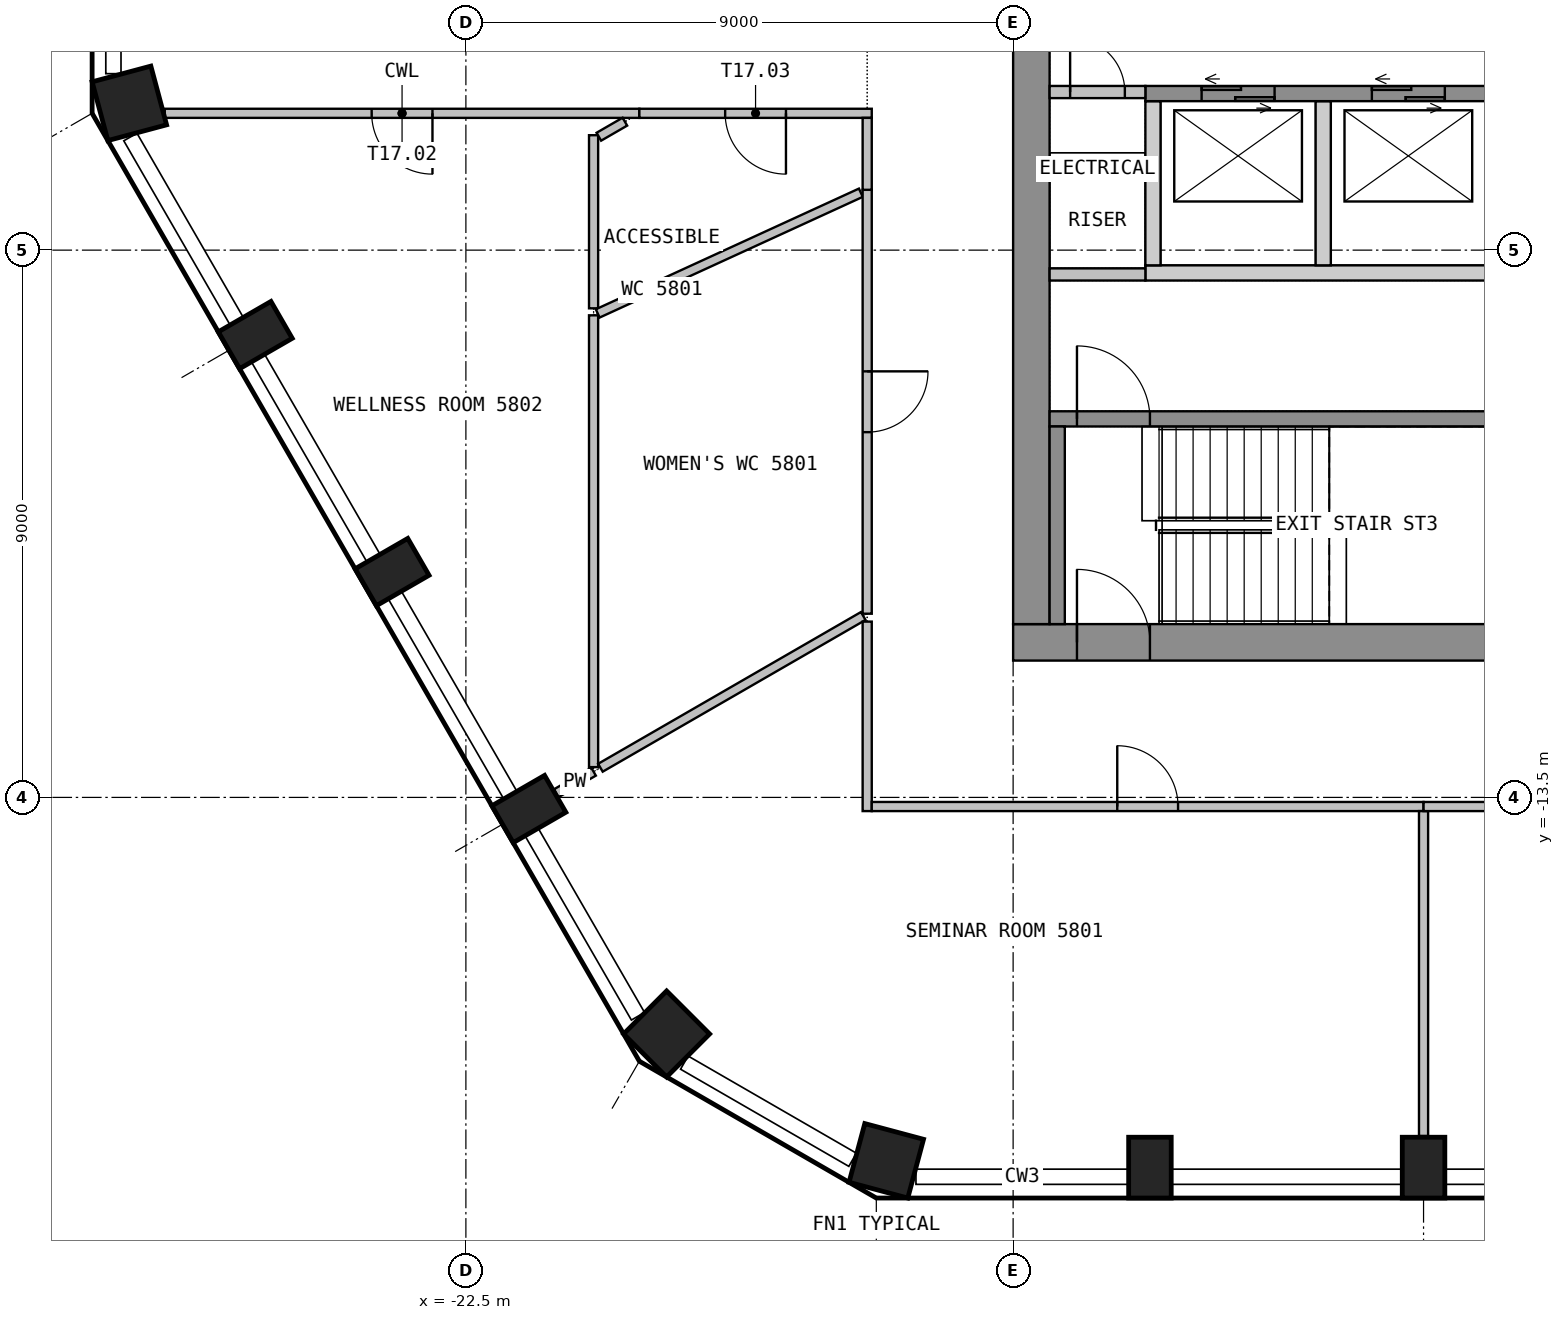
"""IFC4 building model, lengths in metres.
Left out: names, types, materials, properties, quantities, classifications, styles, units other than length and angle.
Written with IfcOpenShell. Run it as: python <this file> out.ifc"""

import sys

from ifc_helpers import new_model, si_unit, direction, frame, frame_2d, origin, origin_2d, place, context, subcontext, project, spatial, polyline, rectangle, outline, extrude, element, fill, save


model = new_model("IFC4")
c1 = context("Model", 3, precision=1e-05, world=origin(), true_north=direction((0.0, 1.0)))
c2 = subcontext(c1, "Body", "Model", "MODEL_VIEW")
j1 = project(units=[si_unit("LENGTHUNIT", "METRE"), si_unit("PLANEANGLEUNIT", "RADIAN")], contexts=[c1])
p1 = place(None, origin())
s1 = spatial("IfcSite", under=j1, at=p1, CompositionType="ELEMENT")
p2 = place(p1, origin())
s2 = spatial("IfcBuilding", under=s1, at=p2, CompositionType="ELEMENT")
p3 = place(p2, frame((0.0, 0.0, 235.2)))
s3 = spatial("IfcBuildingStorey", under=s2, at=p3, CompositionType="ELEMENT", Elevation=235.2)
p4 = place(p3, frame((-15.586, -19.476, 0.0), z_axis=(0.0, 0.0, 1.0), x_axis=(0.965925826289, -0.258819045103, 0.0)))
e1 = element("IfcColumn", 1, at=p4, inside=s3, PredefinedType="COLUMN", context=c2, shape_type="SweptSolid", body=[
    extrude(rectangle(XDim=1.0, YDim=1.0, at=origin_2d()), origin(), (0.0, 0.0, 1.0), 3.575),
])
for number, where, z_axis, x_axis in (
    (2, (-11.25, -19.588, 0.0), (0.0, 0.0, 1.0), (1.0, 0.0, 0.0)),
    (3, (-6.75, -19.588, 0.0), (0.0, 0.0, 1.0), (1.0, 0.0, 0.0)),
):
    element("IfcColumn", number, at=place(p3, frame(where, z_axis=z_axis, x_axis=x_axis)), inside=s3, PredefinedType="COLUMN", context=c2, shape_type="SweptSolid", body=[
        extrude(rectangle(XDim=0.7, YDim=1.0, at=origin_2d()), origin(), (0.0, 0.0, 1.0), 3.575),
    ])
p5 = place(p3, frame((-28.035, -2.086, 0.0), z_axis=(0.0, 0.0, 1.0), x_axis=(0.258819045103, -0.965925826289, 0.0)))
e4 = element("IfcColumn", 4, at=p5, inside=s3, PredefinedType="COLUMN", context=c2, shape_type="SweptSolid", body=[
    extrude(rectangle(XDim=1.0, YDim=1.0, at=origin_2d()), origin(), (0.0, 0.0, 1.0), 3.575),
])
for number, where, z_axis, x_axis in (
    (5, (-25.964, -5.897, 0.0), (0.0, 0.0, 1.0), (0.5, -0.866, 0.0)),
    (6, (-23.714, -9.794, 0.0), (0.0, 0.0, 1.0), (0.5, -0.866, 0.0)),
    (7, (-21.464, -13.691, 0.0), (0.0, 0.0, 1.0), (0.5, -0.866, 0.0)),
):
    element("IfcColumn", number, at=place(p3, frame(where, z_axis=z_axis, x_axis=x_axis)), inside=s3, PredefinedType="COLUMN", context=c2, shape_type="SweptSolid", body=[
        extrude(rectangle(XDim=0.7, YDim=1.0, at=origin_2d()), origin(), (0.0, 0.0, 1.0), 3.575),
    ])
p6 = place(p3, frame((-19.199, -17.39, 0.0), z_axis=(0.0, 0.0, 1.0), x_axis=(0.707106781187, -0.707106781187, 0.0)))
e8 = element("IfcColumn", 8, at=p6, inside=s3, PredefinedType="COLUMN", context=c2, shape_type="SweptSolid", body=[
    extrude(rectangle(XDim=1.0, YDim=1.0, at=origin_2d()), origin(), (0.0, 0.0, 1.0), 3.575),
])
p7 = place(p3, frame((-13.5, -10.95, 0.0), z_axis=(0.0, 0.0, 1.0), x_axis=(1.0, 0.0, 0.0)))
e9 = element("IfcWall", 9, at=p7, inside=s3, PredefinedType="SHEAR", context=c2, shape_type="SweptSolid", body=[
    extrude(rectangle(XDim=27.0, YDim=0.6, at=frame_2d((13.5, 0.0))), origin(), (0.0, 0.0, 1.0), 3.575),
])
p8 = place(p7, frame((12.3, 0.0, 0.0)))
e10 = element("IfcOpeningElement", 10, at=p8, cuts=e9, PredefinedType="OPENING", context=c2, shape_type="SweptSolid", body=[
    extrude(rectangle(XDim=2.4, YDim=2.1, at=frame_2d((1.2, 1.05))), frame((0.0, 0.31, 0.0), z_axis=(0.0, -1.0, 0.0), x_axis=(1.0, 0.0, 0.0)), (0.0, 0.0, 1.0), 0.62),
])
p9 = place(p7, frame((1.05, 0.0, 0.0)))
e11 = element("IfcOpeningElement", 11, at=p9, cuts=e9, PredefinedType="OPENING", context=c2, shape_type="SweptSolid", body=[
    extrude(rectangle(XDim=1.2, YDim=2.1, at=frame_2d((0.6, 1.05))), frame((0.0, 0.31, 0.0), z_axis=(0.0, -1.0, 0.0), x_axis=(1.0, 0.0, 0.0)), (0.0, 0.0, 1.0), 0.62),
])
p10 = place(p7, frame((24.75, 0.0, 0.0)))
e12 = element("IfcOpeningElement", 12, at=p10, cuts=e9, PredefinedType="OPENING", context=c2, shape_type="SweptSolid", body=[
    extrude(rectangle(XDim=1.2, YDim=2.1, at=frame_2d((0.6, 1.05))), frame((0.0, 0.31, 0.0), z_axis=(0.0, -1.0, 0.0), x_axis=(1.0, 0.0, 0.0)), (0.0, 0.0, 1.0), 0.62),
])
p11 = place(p3, frame((-13.2, -10.65, 0.0), z_axis=(0.0, 0.0, 1.0), x_axis=(0.0, 1.0, 0.0)))
e13 = element("IfcWall", 13, at=p11, inside=s3, PredefinedType="SHEAR", context=c2, shape_type="SweptSolid", body=[
    extrude(rectangle(XDim=21.3, YDim=0.6, at=frame_2d((10.65, 0.0))), origin(), (0.0, 0.0, 1.0), 3.575),
])
p12 = place(p11, frame((9.45, 0.0, 0.0)))
e14 = element("IfcOpeningElement", 14, at=p12, cuts=e13, PredefinedType="OPENING", context=c2, shape_type="SweptSolid", body=[
    extrude(rectangle(XDim=2.4, YDim=2.1, at=frame_2d((1.2, 1.05))), frame((0.0, 0.31, 0.0), z_axis=(0.0, -1.0, 0.0), x_axis=(1.0, 0.0, 0.0)), (0.0, 0.0, 1.0), 0.62),
])
p13 = place(p3, origin())
e15 = element("IfcWall", 15, at=p13, inside=s3, PredefinedType="SHEAR", context=c2, shape_type="SweptSolid", body=[
    extrude(outline(polyline([(-11.325, -5.0), (-2.675, -5.0), (-2.675, -4.75), (-11.325, -4.75), (-11.325, -5.0)])), origin(), (0.0, 0.0, 1.0), 3.575),
])
p14 = place(p3, origin())
e16 = element("IfcWall", 16, at=p14, inside=s3, PredefinedType="SHEAR", context=c2, shape_type="SweptSolid", body=[
    extrude(outline(polyline([(-11.325, -4.75), (-11.075, -4.75), (-11.075, -2.05), (-11.325, -2.05), (-11.325, -4.75)])), origin(), (0.0, 0.0, 1.0), 3.575),
])
p15 = place(p3, origin())
e17 = element("IfcWall", 17, at=p15, inside=s3, PredefinedType="SHEAR", context=c2, shape_type="SweptSolid", body=[
    extrude(outline(polyline([(-8.525, -4.75), (-8.275, -4.75), (-8.275, -2.05), (-8.525, -2.05), (-8.525, -4.75)])), origin(), (0.0, 0.0, 1.0), 3.575),
])
p16 = place(p3, frame((-11.325, -1.925, 0.0), z_axis=(0.0, 0.0, 1.0), x_axis=(1.0, 0.0, 0.0)))
e18 = element("IfcWall", 18, at=p16, inside=s3, PredefinedType="SHEAR", context=c2, shape_type="SweptSolid", body=[
    extrude(rectangle(XDim=8.65, YDim=0.25, at=frame_2d((4.325, 0.0))), origin(), (0.0, 0.0, 1.0), 3.575),
])
p17 = place(p16, frame((0.925, 0.0, 0.0)))
e19 = element("IfcOpeningElement", 19, at=p17, cuts=e18, PredefinedType="OPENING", context=c2, shape_type="SweptSolid", body=[
    extrude(rectangle(XDim=1.2, YDim=2.1, at=frame_2d((0.6, 1.05))), frame((0.0, 0.135, 0.0), z_axis=(0.0, -1.0, 0.0), x_axis=(1.0, 0.0, 0.0)), (0.0, 0.0, 1.0), 0.27),
])
p18 = place(p16, frame((3.725, 0.0, 0.0)))
e20 = element("IfcOpeningElement", 20, at=p18, cuts=e18, PredefinedType="OPENING", context=c2, shape_type="SweptSolid", body=[
    extrude(rectangle(XDim=1.2, YDim=2.1, at=frame_2d((0.6, 1.05))), frame((0.0, 0.135, 0.0), z_axis=(0.0, -1.0, 0.0), x_axis=(1.0, 0.0, 0.0)), (0.0, 0.0, 1.0), 0.27),
])
p19 = place(p16, frame((6.525, 0.0, 0.0)))
e21 = element("IfcOpeningElement", 21, at=p19, cuts=e18, PredefinedType="OPENING", context=c2, shape_type="SweptSolid", body=[
    extrude(rectangle(XDim=1.2, YDim=2.1, at=frame_2d((0.6, 1.05))), frame((0.0, 0.135, 0.0), z_axis=(0.0, -1.0, 0.0), x_axis=(1.0, 0.0, 0.0)), (0.0, 0.0, 1.0), 0.27),
])
p20 = place(p3, frame((-12.9, -7.275, 0.0), z_axis=(0.0, 0.0, 1.0), x_axis=(1.0, 0.0, 0.0)))
e22 = element("IfcWall", 22, at=p20, inside=s3, PredefinedType="SHEAR", context=c2, shape_type="SweptSolid", body=[
    extrude(rectangle(XDim=10.1, YDim=0.25, at=frame_2d((5.05, 0.0))), origin(), (0.0, 0.0, 1.0), 3.575),
])
p21 = place(p20, frame((0.45, 0.0, 0.0)))
e23 = element("IfcOpeningElement", 23, at=p21, cuts=e22, PredefinedType="OPENING", context=c2, shape_type="SweptSolid", body=[
    extrude(rectangle(XDim=1.2, YDim=2.1, at=frame_2d((0.6, 1.05))), frame((0.0, 0.135, 0.0), z_axis=(0.0, -1.0, 0.0), x_axis=(1.0, 0.0, 0.0)), (0.0, 0.0, 1.0), 0.27),
])
p22 = place(p3, frame((-12.775, -10.65, 0.0), z_axis=(0.0, 0.0, 1.0), x_axis=(0.0, 1.0, 0.0)))
e24 = element("IfcWall", 24, at=p22, inside=s3, PredefinedType="SHEAR", context=c2, shape_type="SweptSolid", body=[
    extrude(rectangle(XDim=3.25, YDim=0.25, at=frame_2d((1.625, 0.0))), origin(), (0.0, 0.0, 1.0), 3.575),
])
p23 = place(p3, frame((-12.9, -1.9, 0.0), z_axis=(0.0, 0.0, 1.0), x_axis=(1.0, 0.0, 0.0)))
e25 = element("IfcWall", 25, at=p23, inside=s3, PredefinedType="PARTITIONING", context=c2, shape_type="SweptSolid", body=[
    extrude(rectangle(XDim=1.575, YDim=0.2, at=frame_2d((0.788, 0.0))), origin(), (0.0, 0.0, 1.0), 3.575),
])
p24 = place(p23, frame((0.337, 0.0, 0.0)))
e26 = element("IfcOpeningElement", 26, at=p24, cuts=e25, PredefinedType="OPENING", context=c2, shape_type="SweptSolid", body=[
    extrude(rectangle(XDim=0.9, YDim=2.1, at=frame_2d((0.45, 1.05))), frame((0.0, 0.11, 0.0), z_axis=(0.0, -1.0, 0.0), x_axis=(1.0, 0.0, 0.0)), (0.0, 0.0, 1.0), 0.22),
])
p25 = place(p3, frame((-12.9, -4.9, 0.0), z_axis=(0.0, 0.0, 1.0), x_axis=(1.0, 0.0, 0.0)))
e27 = element("IfcWall", 27, at=p25, inside=s3, PredefinedType="PARTITIONING", context=c2, shape_type="SweptSolid", body=[
    extrude(rectangle(XDim=1.575, YDim=0.2, at=frame_2d((0.788, 0.0))), origin(), (0.0, 0.0, 1.0), 3.575),
])
p26 = place(p3, frame((-19.647, -2.25, 0.0), z_axis=(0.0, 0.0, 1.0), x_axis=(-1.0, 0.0, 0.0)))
e28 = element("IfcWall", 28, at=p26, inside=s3, PredefinedType="PARTITIONING", context=c2, shape_type="SweptSolid", body=[
    extrude(rectangle(XDim=7.805, YDim=0.15, at=frame_2d((3.903, 0.0))), origin(), (0.0, 0.0, 1.0), 3.575),
])
p27 = place(p26, frame((3.403, 0.0, 0.0)))
e29 = element("IfcOpeningElement", 29, at=p27, cuts=e28, PredefinedType="OPENING", context=c2, shape_type="SweptSolid", body=[
    extrude(rectangle(XDim=1.0, YDim=2.1, at=frame_2d((0.5, 1.05))), frame((0.0, 0.085, 0.0), z_axis=(0.0, -1.0, 0.0), x_axis=(1.0, 0.0, 0.0)), (0.0, 0.0, 1.0), 0.17),
])
p28 = place(p3, frame((-20.4, -13.077, 0.0), z_axis=(0.0, 0.0, 1.0), x_axis=(-0.866030760678, -0.499990721473, 0.0)))
e30 = element("IfcWall", 30, at=p28, inside=s3, PredefinedType="PARTITIONING", context=c2, shape_type="SweptSolid", body=[
    extrude(rectangle(XDim=0.709, YDim=0.15, at=frame_2d((0.354, 0.0))), origin(), (0.0, 0.0, 1.0), 3.575),
])
p29 = place(p3, frame((-20.4, -5.572, 0.0), z_axis=(0.0, 0.0, 1.0), x_axis=(0.0, -1.0, 0.0)))
e31 = element("IfcWall", 31, at=p29, inside=s3, PredefinedType="PARTITIONING", context=c2, shape_type="SweptSolid", body=[
    extrude(rectangle(XDim=7.43, YDim=0.15, at=frame_2d((3.715, 0.0))), origin(), (0.0, 0.0, 1.0), 3.575),
])
p30 = place(p3, frame((-15.965, -10.517, 0.0), z_axis=(0.0, 0.0, 1.0), x_axis=(-0.866034070548, -0.499984988425, 0.0)))
e32 = element("IfcWall", 32, at=p30, inside=s3, PredefinedType="PARTITIONING", context=c2, shape_type="SweptSolid", body=[
    extrude(rectangle(XDim=4.991, YDim=0.15, at=frame_2d((2.496, 0.0))), origin(), (0.0, 0.0, 1.0), 3.575),
])
p31 = place(p3, frame((-20.4, -2.61, 0.0), z_axis=(0.0, 0.0, 1.0), x_axis=(0.0, -1.0, 0.0)))
e33 = element("IfcWall", 33, at=p31, inside=s3, PredefinedType="PARTITIONING", context=c2, shape_type="SweptSolid", body=[
    extrude(rectangle(XDim=2.847, YDim=0.15, at=frame_2d((1.423, 0.0))), origin(), (0.0, 0.0, 1.0), 3.575),
])
p32 = place(p3, frame((-16.005, -3.556, 0.0), z_axis=(0.0, 0.0, 1.0), x_axis=(-0.908938523631, -0.416930162329, 0.0)))
e34 = element("IfcWall", 34, at=p32, inside=s3, PredefinedType="PARTITIONING", context=c2, shape_type="SweptSolid", body=[
    extrude(rectangle(XDim=4.761, YDim=0.15, at=frame_2d((2.38, 0.0))), origin(), (0.0, 0.0, 1.0), 3.575),
])
p33 = place(p3, frame((-19.885, -2.387, 0.0), z_axis=(0.0, 0.0, 1.0), x_axis=(-0.865865073245, -0.500277597875, 0.0)))
e35 = element("IfcWall", 35, at=p33, inside=s3, PredefinedType="PARTITIONING", context=c2, shape_type="SweptSolid", body=[
    extrude(rectangle(XDim=0.495, YDim=0.15, at=frame_2d((0.248, 0.0))), origin(), (0.0, 0.0, 1.0), 3.575),
])
p34 = place(p3, frame((-15.825, -2.25, 0.0), z_axis=(0.0, 0.0, 1.0), x_axis=(-1.0, 0.0, 0.0)))
e36 = element("IfcWall", 36, at=p34, inside=s3, PredefinedType="PARTITIONING", context=c2, shape_type="SweptSolid", body=[
    extrude(rectangle(XDim=3.822, YDim=0.15, at=frame_2d((1.911, 0.0))), origin(), (0.0, 0.0, 1.0), 3.575),
])
p35 = place(p34, frame((1.411, 0.0, 0.0)))
e37 = element("IfcOpeningElement", 37, at=p35, cuts=e36, PredefinedType="OPENING", context=c2, shape_type="SweptSolid", body=[
    extrude(rectangle(XDim=1.0, YDim=2.1, at=frame_2d((0.5, 1.05))), frame((0.0, 0.085, 0.0), z_axis=(0.0, -1.0, 0.0), x_axis=(1.0, 0.0, 0.0)), (0.0, 0.0, 1.0), 0.17),
])
p36 = place(p3, frame((-15.9, -10.609, 0.0), z_axis=(0.0, 0.0, 1.0), x_axis=(0.0, -1.0, 0.0)))
e38 = element("IfcWall", 38, at=p36, inside=s3, PredefinedType="PARTITIONING", context=c2, shape_type="SweptSolid", body=[
    extrude(rectangle(XDim=3.116, YDim=0.15, at=frame_2d((1.558, 0.0))), origin(), (0.0, 0.0, 1.0), 3.575),
])
p37 = place(p3, frame((-15.825, -13.65, 0.0), z_axis=(0.0, 0.0, 1.0), x_axis=(1.0, 0.0, 0.0)))
e39 = element("IfcWall", 39, at=p37, inside=s3, PredefinedType="PARTITIONING", context=c2, shape_type="SweptSolid", body=[
    extrude(rectangle(XDim=9.075, YDim=0.15, at=frame_2d((4.538, 0.0))), origin(), (0.0, 0.0, 1.0), 3.575),
])
p38 = place(p37, frame((4.038, 0.0, 0.0)))
e40 = element("IfcOpeningElement", 40, at=p38, cuts=e39, PredefinedType="OPENING", context=c2, shape_type="SweptSolid", body=[
    extrude(rectangle(XDim=1.0, YDim=2.1, at=frame_2d((0.5, 1.05))), frame((0.0, 0.085, 0.0), z_axis=(0.0, -1.0, 0.0), x_axis=(1.0, 0.0, 0.0)), (0.0, 0.0, 1.0), 0.17),
])
p39 = place(p3, frame((-15.9, -3.508, 0.0), z_axis=(0.0, 0.0, 1.0), x_axis=(0.0, -1.0, 0.0)))
e41 = element("IfcWall", 41, at=p39, inside=s3, PredefinedType="PARTITIONING", context=c2, shape_type="SweptSolid", body=[
    extrude(rectangle(XDim=6.971, YDim=0.15, at=frame_2d((3.485, 0.0))), origin(), (0.0, 0.0, 1.0), 3.575),
])
p40 = place(p39, frame((2.986, 0.0, 0.0)))
e42 = element("IfcOpeningElement", 42, at=p40, cuts=e41, PredefinedType="OPENING", context=c2, shape_type="SweptSolid", body=[
    extrude(rectangle(XDim=1.0, YDim=2.1, at=frame_2d((0.5, 1.05))), frame((0.0, 0.085, 0.0), z_axis=(0.0, -1.0, 0.0), x_axis=(1.0, 0.0, 0.0)), (0.0, 0.0, 1.0), 0.17),
])
p41 = place(p3, frame((-15.9, -2.325, 0.0), z_axis=(0.0, 0.0, 1.0), x_axis=(0.0, -1.0, 0.0)))
e43 = element("IfcWall", 43, at=p41, inside=s3, PredefinedType="PARTITIONING", context=c2, shape_type="SweptSolid", body=[
    extrude(rectangle(XDim=1.183, YDim=0.15, at=frame_2d((0.592, 0.0))), origin(), (0.0, 0.0, 1.0), 3.575),
])
p42 = place(p3, frame((-6.75, -13.725, 0.0), z_axis=(0.0, 0.0, 1.0), x_axis=(0.0, -1.0, 0.0)))
e44 = element("IfcWall", 44, at=p42, inside=s3, PredefinedType="PARTITIONING", context=c2, shape_type="SweptSolid", body=[
    extrude(rectangle(XDim=5.344, YDim=0.15, at=frame_2d((2.672, 0.0))), origin(), (0.0, 0.0, 1.0), 3.575),
])
p43 = place(p3, frame((-6.75, -13.65, 0.0), z_axis=(0.0, 0.0, 1.0), x_axis=(1.0, 0.0, 0.0)))
e45 = element("IfcWall", 45, at=p43, inside=s3, PredefinedType="PARTITIONING", context=c2, shape_type="SweptSolid", body=[
    extrude(rectangle(XDim=18.0, YDim=0.15, at=frame_2d((9.0, 0.0))), origin(), (0.0, 0.0, 1.0), 3.575),
])
p44 = place(p43, frame((8.5, 0.0, 0.0)))
e46 = element("IfcOpeningElement", 46, at=p44, cuts=e45, PredefinedType="OPENING", context=c2, shape_type="SweptSolid", body=[
    extrude(rectangle(XDim=1.0, YDim=2.1, at=frame_2d((0.5, 1.05))), frame((0.0, 0.085, 0.0), z_axis=(0.0, -1.0, 0.0), x_axis=(1.0, 0.0, 0.0)), (0.0, 0.0, 1.0), 0.17),
])
p45 = place(p9, origin())
e47 = element("IfcDoor", 47, at=p45, inside=s3, OperationType="SINGLE_SWING_RIGHT", PredefinedType="DOOR", context=c2, shape_type="SweptSolid", body=[
    extrude(rectangle(XDim=1.2, YDim=2.1, at=frame_2d((0.6, 1.05))), frame((0.0, 0.025, 0.0), z_axis=(0.0, -1.0, 0.0), x_axis=(1.0, 0.0, 0.0)), (0.0, 0.0, 1.0), 0.05),
])
fill(e11, e47)
p46 = place(p17, origin())
e48 = element("IfcDoor", 48, at=p46, inside=s3, OperationType="DOUBLE_DOOR_SLIDING", PredefinedType="DOOR", context=c2, shape_type="SweptSolid", body=[
    extrude(rectangle(XDim=1.2, YDim=2.1, at=frame_2d((0.6, 1.05))), frame((0.0, 0.025, 0.0), z_axis=(0.0, -1.0, 0.0), x_axis=(1.0, 0.0, 0.0)), (0.0, 0.0, 1.0), 0.05),
])
fill(e19, e48)
p47 = place(p18, origin())
e49 = element("IfcDoor", 49, at=p47, inside=s3, OperationType="DOUBLE_DOOR_SLIDING", PredefinedType="DOOR", context=c2, shape_type="SweptSolid", body=[
    extrude(rectangle(XDim=1.2, YDim=2.1, at=frame_2d((0.6, 1.05))), frame((0.0, 0.025, 0.0), z_axis=(0.0, -1.0, 0.0), x_axis=(1.0, 0.0, 0.0)), (0.0, 0.0, 1.0), 0.05),
])
fill(e20, e49)
p48 = place(p21, origin())
e50 = element("IfcDoor", 50, at=p48, inside=s3, OperationType="SINGLE_SWING_LEFT", PredefinedType="DOOR", context=c2, shape_type="SweptSolid", body=[
    extrude(rectangle(XDim=1.2, YDim=2.1, at=frame_2d((0.6, 1.05))), frame((0.0, 0.025, 0.0), z_axis=(0.0, -1.0, 0.0), x_axis=(1.0, 0.0, 0.0)), (0.0, 0.0, 1.0), 0.05),
])
fill(e23, e50)
p49 = place(p24, origin())
e51 = element("IfcDoor", 51, at=p49, inside=s3, OperationType="SINGLE_SWING_LEFT", PredefinedType="DOOR", context=c2, shape_type="SweptSolid", body=[
    extrude(rectangle(XDim=0.9, YDim=2.1, at=frame_2d((0.45, 1.05))), frame((0.0, 0.025, 0.0), z_axis=(0.0, -1.0, 0.0), x_axis=(1.0, 0.0, 0.0)), (0.0, 0.0, 1.0), 0.05),
])
fill(e26, e51)
p50 = place(p27, origin())
e52 = element("IfcDoor", 52, at=p50, inside=s3, OperationType="SINGLE_SWING_RIGHT", PredefinedType="DOOR", context=c2, shape_type="SweptSolid", body=[
    extrude(rectangle(XDim=1.0, YDim=2.1, at=frame_2d((0.5, 1.05))), frame((0.0, 0.025, 0.0), z_axis=(0.0, -1.0, 0.0), x_axis=(1.0, 0.0, 0.0)), (0.0, 0.0, 1.0), 0.05),
])
fill(e29, e52)
p51 = place(p35, origin())
e53 = element("IfcDoor", 53, at=p51, inside=s3, OperationType="SINGLE_SWING_RIGHT", PredefinedType="DOOR", context=c2, shape_type="SweptSolid", body=[
    extrude(rectangle(XDim=1.0, YDim=2.1, at=frame_2d((0.5, 1.05))), frame((0.0, 0.025, 0.0), z_axis=(0.0, -1.0, 0.0), x_axis=(1.0, 0.0, 0.0)), (0.0, 0.0, 1.0), 0.05),
])
fill(e37, e53)
p52 = place(p40, origin())
e54 = element("IfcDoor", 54, at=p52, inside=s3, OperationType="SINGLE_SWING_RIGHT", PredefinedType="DOOR", context=c2, shape_type="SweptSolid", body=[
    extrude(rectangle(XDim=1.0, YDim=2.1, at=frame_2d((0.5, 1.05))), frame((0.0, 0.025, 0.0), z_axis=(0.0, -1.0, 0.0), x_axis=(1.0, 0.0, 0.0)), (0.0, 0.0, 1.0), 0.05),
])
fill(e42, e54)
p53 = place(p38, origin())
e55 = element("IfcDoor", 55, at=p53, inside=s3, OperationType="SINGLE_SWING_RIGHT", PredefinedType="DOOR", context=c2, shape_type="SweptSolid", body=[
    extrude(rectangle(XDim=1.0, YDim=2.1, at=frame_2d((0.5, 1.05))), frame((0.0, 0.025, 0.0), z_axis=(0.0, -1.0, 0.0), x_axis=(1.0, 0.0, 0.0)), (0.0, 0.0, 1.0), 0.05),
])
fill(e40, e55)
save(model, sys.argv[1])
